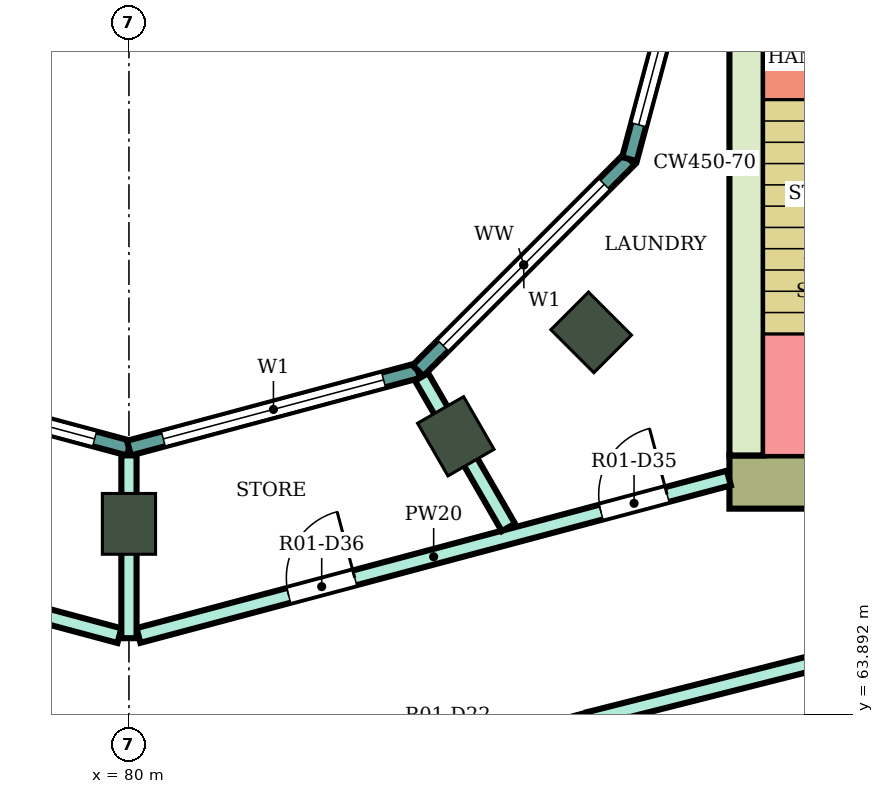
"""IFC4 building model, lengths in metres.
Left out: names, types, materials, properties, quantities, classifications, styles, units other than length and angle.
Written with IfcOpenShell. Run it as: python <this file> out.ifc"""

import sys

from ifc_helpers import new_model, si_unit, direction, frame, frame_2d, origin, origin_2d, place, context, subcontext, project, spatial, rectangle, extrude, element, fill, save


model = new_model("IFC4")
c1 = context("Model", 3, precision=1e-05, world=origin(), true_north=direction((0.0, 1.0)))
c2 = subcontext(c1, "Body", "Model", "MODEL_VIEW")
j1 = project(units=[si_unit("LENGTHUNIT", "METRE"), si_unit("PLANEANGLEUNIT", "RADIAN")], contexts=[c1])
p1 = place(None, origin())
s1 = spatial("IfcSite", under=j1, at=p1, CompositionType="ELEMENT")
p2 = place(p1, origin())
s2 = spatial("IfcBuilding", under=s1, at=p2, CompositionType="ELEMENT")
p3 = place(p2, frame((0.0, 0.0, 165.9)))
s3 = spatial("IfcBuildingStorey", under=s2, at=p3, CompositionType="ELEMENT", Elevation=165.9)
for number, where, z_axis, x_axis in (
    (1, (80.0, 66.4, 0.0), (0.0, 0.0, 1.0), (0.0, -1.0, 0.0)),
    (2, (84.3, 67.552, 0.0), (0.0, 0.0, 1.0), (0.5, -0.866, 0.0)),
    (3, (86.081, 68.919, 0.0), (0.0, 0.0, 1.0), (0.707, -0.707, 0.0)),
):
    element("IfcColumn", number, at=place(p3, frame(where, z_axis=z_axis, x_axis=x_axis)), inside=s3, PredefinedType="COLUMN", context=c2, shape_type="SweptSolid", body=[
        extrude(rectangle(XDim=0.8, YDim=0.7, at=origin_2d()), origin(), (0.0, 0.0, 1.0), 4.1),
    ])
p4 = place(p3, frame((87.9, 66.95, 0.0), z_axis=(0.0, 0.0, 1.0), x_axis=(1.0, 0.0, 0.0)))
e4 = element("IfcWall", 4, at=p4, inside=s3, PredefinedType="SHEAR", context=c2, shape_type="SweptSolid", body=[
    extrude(rectangle(XDim=14.8, YDim=0.7, at=frame_2d((7.4, 0.0))), origin(), (0.0, 0.0, 1.0), 3.78),
])
p5 = place(p4, frame((4.2, 0.0, 0.0)))
e5 = element("IfcOpeningElement", 5, at=p5, cuts=e4, PredefinedType="OPENING", context=c2, shape_type="SweptSolid", body=[
    extrude(rectangle(XDim=2.4, YDim=2.4, at=frame_2d((1.2, 1.2))), frame((0.0, 0.36, 0.0), z_axis=(0.0, -1.0, 0.0), x_axis=(1.0, 0.0, 0.0)), (0.0, 0.0, 1.0), 0.72),
])
p6 = place(p3, frame((88.125, 67.3, 0.0), z_axis=(0.0, 0.0, 1.0), x_axis=(0.0, 1.0, 0.0)))
e6 = element("IfcWall", 6, at=p6, inside=s3, PredefinedType="SHEAR", context=c2, shape_type="SweptSolid", body=[
    extrude(rectangle(XDim=7.7, YDim=0.45, at=frame_2d((3.85, 0.0))), origin(), (0.0, 0.0, 1.0), 3.78),
])
p7 = place(p3, frame((76.198, 68.415, 0.0), z_axis=(0.0, 0.0, 1.0), x_axis=(0.965933654434, -0.258789828301, 0.0)))
e7 = element("IfcWall", 7, at=p7, inside=s3, PredefinedType="NOTDEFINED", context=c2, shape_type="SweptSolid", body=[
    extrude(rectangle(XDim=3.936, YDim=0.2, at=frame_2d((1.968, 0.0))), origin(), (0.0, 0.0, 1.0), 4.1),
])
p8 = place(p7, frame((0.468, 0.0, 0.9)))
e8 = element("IfcOpeningElement", 8, at=p8, cuts=e7, PredefinedType="OPENING", context=c2, shape_type="SweptSolid", body=[
    extrude(rectangle(XDim=3.0, YDim=2.3, at=frame_2d((1.5, 1.15))), frame((0.0, 0.11, 0.0), z_axis=(0.0, -1.0, 0.0), x_axis=(1.0, 0.0, 0.0)), (0.0, 0.0, 1.0), 0.22),
])
p9 = place(p3, frame((80.0, 67.396, 0.0), z_axis=(0.0, 0.0, 1.0), x_axis=(0.965933654434, 0.258789828301, 0.0)))
e9 = element("IfcWall", 9, at=p9, inside=s3, PredefinedType="NOTDEFINED", context=c2, shape_type="SweptSolid", body=[
    extrude(rectangle(XDim=3.936, YDim=0.2, at=frame_2d((1.968, 0.0))), origin(), (0.0, 0.0, 1.0), 4.1),
])
p10 = place(p9, frame((0.468, 0.0, 0.9)))
e10 = element("IfcOpeningElement", 10, at=p10, cuts=e9, PredefinedType="OPENING", context=c2, shape_type="SweptSolid", body=[
    extrude(rectangle(XDim=3.0, YDim=2.3, at=frame_2d((1.5, 1.15))), frame((0.0, 0.11, 0.0), z_axis=(0.0, -1.0, 0.0), x_axis=(1.0, 0.0, 0.0)), (0.0, 0.0, 1.0), 0.22),
])
p11 = place(p3, frame((83.802, 68.415, 0.0), z_axis=(0.0, 0.0, 1.0), x_axis=(0.707106781187, 0.707106781187, 0.0)))
e11 = element("IfcWall", 11, at=p11, inside=s3, PredefinedType="NOTDEFINED", context=c2, shape_type="SweptSolid", body=[
    extrude(rectangle(XDim=3.936, YDim=0.2, at=frame_2d((1.968, 0.0))), origin(), (0.0, 0.0, 1.0), 4.1),
])
p12 = place(p11, frame((0.468, 0.0, 0.9)))
e12 = element("IfcOpeningElement", 12, at=p12, cuts=e11, PredefinedType="OPENING", context=c2, shape_type="SweptSolid", body=[
    extrude(rectangle(XDim=3.0, YDim=2.3, at=frame_2d((1.5, 1.15))), frame((0.0, 0.11, 0.0), z_axis=(0.0, -1.0, 0.0), x_axis=(1.0, 0.0, 0.0)), (0.0, 0.0, 1.0), 0.22),
])
p13 = place(p3, frame((86.585, 71.198, 0.0), z_axis=(0.0, 0.0, 1.0), x_axis=(0.258789828301, 0.965933654434, 0.0)))
e13 = element("IfcWall", 13, at=p13, inside=s3, PredefinedType="NOTDEFINED", context=c2, shape_type="SweptSolid", body=[
    extrude(rectangle(XDim=3.936, YDim=0.2, at=frame_2d((1.968, 0.0))), origin(), (0.0, 0.0, 1.0), 4.1),
])
p14 = place(p13, frame((0.468, 0.0, 0.9)))
e14 = element("IfcOpeningElement", 14, at=p14, cuts=e13, PredefinedType="OPENING", context=c2, shape_type="SweptSolid", body=[
    extrude(rectangle(XDim=3.0, YDim=2.3, at=frame_2d((1.5, 1.15))), frame((0.0, 0.11, 0.0), z_axis=(0.0, -1.0, 0.0), x_axis=(1.0, 0.0, 0.0)), (0.0, 0.0, 1.0), 0.22),
])
p15 = place(p3, frame((74.603, 66.342, 0.0), z_axis=(0.0, 0.0, 1.0), x_axis=(0.965920893652, -0.258837453254, 0.0)))
e15 = element("IfcWall", 15, at=p15, inside=s3, PredefinedType="PARTITIONING", context=c2, shape_type="SweptSolid", body=[
    extrude(rectangle(XDim=5.458, YDim=0.2, at=frame_2d((2.729, 0.0))), origin(), (0.0, 0.0, 1.0), 3.65),
])
p16 = place(p15, frame((2.512, 0.0, 0.0)))
e16 = element("IfcOpeningElement", 16, at=p16, cuts=e15, PredefinedType="OPENING", context=c2, shape_type="SweptSolid", body=[
    extrude(rectangle(XDim=0.9, YDim=2.1, at=frame_2d((0.45, 1.05))), frame((0.0, 0.11, 0.0), z_axis=(0.0, -1.0, 0.0), x_axis=(1.0, 0.0, 0.0)), (0.0, 0.0, 1.0), 0.22),
])
p17 = place(p3, frame((80.125, 64.932, 0.0), z_axis=(0.0, 0.0, 1.0), x_axis=(0.966236955806, 0.257655089674, 0.0)))
e17 = element("IfcWall", 17, at=p17, inside=s3, PredefinedType="PARTITIONING", context=c2, shape_type="SweptSolid", body=[
    extrude(rectangle(XDim=8.039, YDim=0.2, at=frame_2d((4.02, 0.0))), origin(), (0.0, 0.0, 1.0), 3.65),
])
p18 = place(p17, frame((6.298, 0.0, 0.0)))
e18 = element("IfcOpeningElement", 18, at=p18, cuts=e17, PredefinedType="OPENING", context=c2, shape_type="SweptSolid", body=[
    extrude(rectangle(XDim=0.9, YDim=2.1, at=frame_2d((0.45, 1.05))), frame((0.0, 0.11, 0.0), z_axis=(0.0, -1.0, 0.0), x_axis=(1.0, 0.0, 0.0)), (0.0, 0.0, 1.0), 0.22),
])
p19 = place(p17, frame((2.045, 0.0, 0.0)))
e19 = element("IfcOpeningElement", 19, at=p19, cuts=e17, PredefinedType="OPENING", context=c2, shape_type="SweptSolid", body=[
    extrude(rectangle(XDim=0.9, YDim=2.1, at=frame_2d((0.45, 1.05))), frame((0.0, 0.11, 0.0), z_axis=(0.0, -1.0, 0.0), x_axis=(1.0, 0.0, 0.0)), (0.0, 0.0, 1.0), 0.22),
])
p20 = place(p3, frame((80.0, 62.205, 0.0), z_axis=(0.0, 0.0, 1.0), x_axis=(0.966104192593, 0.258152453124, 0.0)))
e20 = element("IfcWall", 20, at=p20, inside=s3, PredefinedType="PARTITIONING", context=c2, shape_type="SweptSolid", body=[
    extrude(rectangle(XDim=6.266, YDim=0.2, at=frame_2d((3.133, 0.0))), origin(), (0.0, 0.0, 1.0), 3.65),
])
p21 = place(p20, frame((3.842, 0.0, 0.0)))
e21 = element("IfcOpeningElement", 21, at=p21, cuts=e20, PredefinedType="OPENING", context=c2, shape_type="SweptSolid", body=[
    extrude(rectangle(XDim=1.0, YDim=2.1, at=frame_2d((0.5, 1.05))), frame((0.0, 0.11, 0.0), z_axis=(0.0, -1.0, 0.0), x_axis=(1.0, 0.0, 0.0)), (0.0, 0.0, 1.0), 0.22),
])
p22 = place(p3, frame((80.0, 64.896, 0.0), z_axis=(0.0, 0.0, 1.0), x_axis=(0.0, 1.0, 0.0)))
e22 = element("IfcWall", 22, at=p22, inside=s3, PredefinedType="PARTITIONING", context=c2, shape_type="SweptSolid", body=[
    extrude(rectangle(XDim=2.405, YDim=0.2, at=frame_2d((1.203, 0.0))), origin(), (0.0, 0.0, 1.0), 3.65),
])
p23 = place(p3, frame((83.85, 68.333, 0.0), z_axis=(0.0, 0.0, 1.0), x_axis=(0.499953638813, -0.866052168773, 0.0)))
e23 = element("IfcWall", 23, at=p23, inside=s3, PredefinedType="PARTITIONING", context=c2, shape_type="SweptSolid", body=[
    extrude(rectangle(XDim=2.285, YDim=0.2, at=frame_2d((1.143, 0.0))), origin(), (0.0, 0.0, 1.0), 3.65),
])
p24 = place(p3, frame((86.053, 63.826, 0.0), z_axis=(0.0, 0.0, 1.0), x_axis=(0.969490004987, 0.245130843083, 0.0)))
e24 = element("IfcWall", 24, at=p24, inside=s3, PredefinedType="PARTITIONING", context=c2, shape_type="SweptSolid", body=[
    extrude(rectangle(XDim=5.908, YDim=0.2, at=frame_2d((2.954, 0.0))), origin(), (0.0, 0.0, 1.0), 3.65),
])
p25 = place(p8, origin())
e25 = element("IfcWindow", 25, at=p25, inside=s3, PartitioningType="SINGLE_PANEL", PredefinedType="WINDOW", context=c2, shape_type="SweptSolid", body=[
    extrude(rectangle(XDim=3.0, YDim=2.3, at=frame_2d((1.5, 1.15))), frame((0.0, 0.03, 0.0), z_axis=(0.0, -1.0, 0.0), x_axis=(1.0, 0.0, 0.0)), (0.0, 0.0, 1.0), 0.06),
])
fill(e8, e25)
p26 = place(p10, origin())
e26 = element("IfcWindow", 26, at=p26, inside=s3, PartitioningType="SINGLE_PANEL", PredefinedType="WINDOW", context=c2, shape_type="SweptSolid", body=[
    extrude(rectangle(XDim=3.0, YDim=2.3, at=frame_2d((1.5, 1.15))), frame((0.0, 0.03, 0.0), z_axis=(0.0, -1.0, 0.0), x_axis=(1.0, 0.0, 0.0)), (0.0, 0.0, 1.0), 0.06),
])
fill(e10, e26)
p27 = place(p12, origin())
e27 = element("IfcWindow", 27, at=p27, inside=s3, PartitioningType="SINGLE_PANEL", PredefinedType="WINDOW", context=c2, shape_type="SweptSolid", body=[
    extrude(rectangle(XDim=3.0, YDim=2.3, at=frame_2d((1.5, 1.15))), frame((0.0, 0.03, 0.0), z_axis=(0.0, -1.0, 0.0), x_axis=(1.0, 0.0, 0.0)), (0.0, 0.0, 1.0), 0.06),
])
fill(e12, e27)
p28 = place(p14, origin())
e28 = element("IfcWindow", 28, at=p28, inside=s3, PartitioningType="SINGLE_PANEL", PredefinedType="WINDOW", context=c2, shape_type="SweptSolid", body=[
    extrude(rectangle(XDim=3.0, YDim=2.3, at=frame_2d((1.5, 1.15))), frame((0.0, 0.03, 0.0), z_axis=(0.0, -1.0, 0.0), x_axis=(1.0, 0.0, 0.0)), (0.0, 0.0, 1.0), 0.06),
])
fill(e14, e28)
p29 = place(p18, origin())
e29 = element("IfcDoor", 29, at=p29, inside=s3, OperationType="SINGLE_SWING_RIGHT", PredefinedType="DOOR", context=c2, shape_type="SweptSolid", body=[
    extrude(rectangle(XDim=0.9, YDim=2.1, at=frame_2d((0.45, 1.05))), frame((0.0, 0.025, 0.0), z_axis=(0.0, -1.0, 0.0), x_axis=(1.0, 0.0, 0.0)), (0.0, 0.0, 1.0), 0.05),
])
fill(e18, e29)
p30 = place(p19, origin())
e30 = element("IfcDoor", 30, at=p30, inside=s3, OperationType="SINGLE_SWING_RIGHT", PredefinedType="DOOR", context=c2, shape_type="SweptSolid", body=[
    extrude(rectangle(XDim=0.9, YDim=2.1, at=frame_2d((0.45, 1.05))), frame((0.0, 0.025, 0.0), z_axis=(0.0, -1.0, 0.0), x_axis=(1.0, 0.0, 0.0)), (0.0, 0.0, 1.0), 0.05),
])
fill(e19, e30)
save(model, sys.argv[1])
